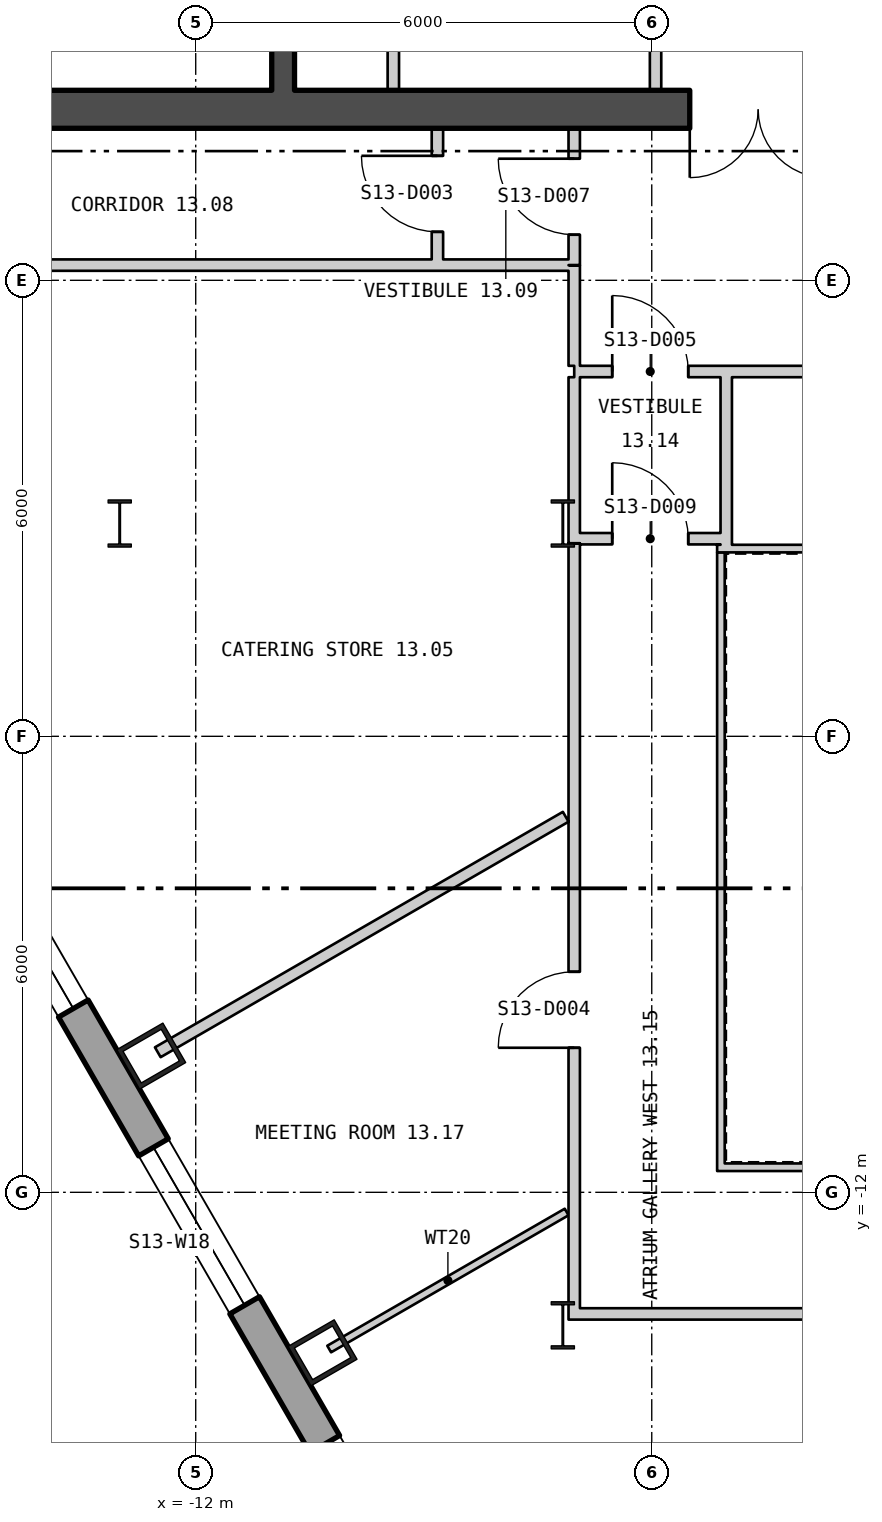
"""IFC4 building model, lengths in metres.
Left out: names, types, materials, properties, quantities, classifications, styles, units other than length and angle.
Written with IfcOpenShell. Run it as: python <this file> out.ifc"""

import sys

from ifc_helpers import new_model, si_unit, direction, frame, frame_2d, origin, origin_2d, place, context, subcontext, project, spatial, polyline, rectangle, hollow_rectangle, i_section, outline, extrude, element, fill, save


model = new_model("IFC4")
c1 = context("Model", 3, precision=1e-05, world=origin(), true_north=direction((0.0, 1.0)))
c2 = subcontext(c1, "Body", "Model", "MODEL_VIEW")
j1 = project(units=[si_unit("LENGTHUNIT", "METRE"), si_unit("PLANEANGLEUNIT", "RADIAN")], contexts=[c1])
p1 = place(None, origin())
s1 = spatial("IfcSite", under=j1, at=p1, CompositionType="ELEMENT")
p2 = place(p1, origin())
s2 = spatial("IfcBuilding", under=s1, at=p2, CompositionType="ELEMENT")
p3 = place(p2, frame((0.0, 0.0, 174.9)))
s3 = spatial("IfcBuildingStorey", under=s2, at=p3, CompositionType="ELEMENT", Elevation=174.9)
for number, where, z_axis, x_axis in (
    (1, (-12.585, -10.208, 0.0), (0.0, 0.0, 1.0), (0.5, -0.866, 0.0)),
    (2, (-10.331, -14.112, 0.0), (0.0, 0.0, 1.0), (0.5, -0.866, 0.0)),
):
    element("IfcColumn", number, at=place(p3, frame(where, z_axis=z_axis, x_axis=x_axis)), inside=s3, PredefinedType="COLUMN", context=c2, shape_type="SweptSolid", body=[
        extrude(hollow_rectangle(XDim=0.6, YDim=0.7, WallThickness=0.06, at=origin_2d()), origin(), (0.0, 0.0, 1.0), 3.9),
    ])
for number, where, z_axis, x_axis in (
    (3, (-7.17, -3.2, 0.0), (0.0, 0.0, 1.0), (1.0, 0.0, 0.0)),
    (4, (-7.17, -13.75, 0.0), (0.0, 0.0, 1.0), (1.0, 0.0, 0.0)),
    (5, (-13.0, -3.2, 0.0), (0.0, 0.0, 1.0), (1.0, 0.0, 0.0)),
):
    element("IfcColumn", number, at=place(p3, frame(where, z_axis=z_axis, x_axis=x_axis)), inside=s3, PredefinedType="COLUMN", context=c2, shape_type="SweptSolid", body=[
        extrude(i_section(OverallWidth=0.305, OverallDepth=0.62, WebThickness=0.021, FlangeThickness=0.04, at=origin_2d()), origin(), (0.0, 0.0, 1.0), 3.9),
    ])
p4 = place(p3, frame((-26.775, 13.22, -0.18), z_axis=(0.0, 0.0, 1.0), x_axis=(0.500000335318, -0.866025210188, 0.0)))
e6 = element("IfcWall", 6, at=p4, inside=s3, PredefinedType="SOLIDWALL", context=c2, shape_type="SweptSolid", body=[
    extrude(outline(polyline([(-0.13, -0.225), (45.88, -0.225), (45.62, 0.225), (0.13, 0.225), (-0.13, -0.225)])), origin(), (0.0, 0.0, 1.0), 3.68),
])
p5 = place(p4, frame((1.425, 0.0, 1.08)))
e7 = element("IfcOpeningElement", 7, at=p5, cuts=e6, PredefinedType="OPENING", context=c2, shape_type="SweptSolid", body=[
    extrude(rectangle(XDim=2.4, YDim=2.0, at=frame_2d((1.2, 1.0))), frame((0.0, 0.235, 0.0), z_axis=(0.0, -1.0, 0.0), x_axis=(1.0, 0.0, 0.0)), (0.0, 0.0, 1.0), 0.47),
])
p6 = place(p4, frame((5.895, 0.0, 1.08)))
e8 = element("IfcOpeningElement", 8, at=p6, cuts=e6, PredefinedType="OPENING", context=c2, shape_type="SweptSolid", body=[
    extrude(rectangle(XDim=2.4, YDim=2.0, at=frame_2d((1.2, 1.0))), frame((0.0, 0.235, 0.0), z_axis=(0.0, -1.0, 0.0), x_axis=(1.0, 0.0, 0.0)), (0.0, 0.0, 1.0), 0.47),
])
p7 = place(p4, frame((10.403, 0.0, 1.08)))
e9 = element("IfcOpeningElement", 9, at=p7, cuts=e6, PredefinedType="OPENING", context=c2, shape_type="SweptSolid", body=[
    extrude(rectangle(XDim=2.4, YDim=2.0, at=frame_2d((1.2, 1.0))), frame((0.0, 0.235, 0.0), z_axis=(0.0, -1.0, 0.0), x_axis=(1.0, 0.0, 0.0)), (0.0, 0.0, 1.0), 0.47),
])
p8 = place(p4, frame((14.912, 0.0, 1.08)))
e10 = element("IfcOpeningElement", 10, at=p8, cuts=e6, PredefinedType="OPENING", context=c2, shape_type="SweptSolid", body=[
    extrude(rectangle(XDim=2.4, YDim=2.0, at=frame_2d((1.2, 1.0))), frame((0.0, 0.235, 0.0), z_axis=(0.0, -1.0, 0.0), x_axis=(1.0, 0.0, 0.0)), (0.0, 0.0, 1.0), 0.47),
])
p9 = place(p4, frame((19.421, 0.0, 1.08)))
e11 = element("IfcOpeningElement", 11, at=p9, cuts=e6, PredefinedType="OPENING", context=c2, shape_type="SweptSolid", body=[
    extrude(rectangle(XDim=2.4, YDim=2.0, at=frame_2d((1.2, 1.0))), frame((0.0, 0.235, 0.0), z_axis=(0.0, -1.0, 0.0), x_axis=(1.0, 0.0, 0.0)), (0.0, 0.0, 1.0), 0.47),
])
p10 = place(p4, frame((23.929, 0.0, 1.08)))
e12 = element("IfcOpeningElement", 12, at=p10, cuts=e6, PredefinedType="OPENING", context=c2, shape_type="SweptSolid", body=[
    extrude(rectangle(XDim=2.4, YDim=2.0, at=frame_2d((1.2, 1.0))), frame((0.0, 0.235, 0.0), z_axis=(0.0, -1.0, 0.0), x_axis=(1.0, 0.0, 0.0)), (0.0, 0.0, 1.0), 0.47),
])
p11 = place(p4, frame((28.438, 0.0, 1.08)))
e13 = element("IfcOpeningElement", 13, at=p11, cuts=e6, PredefinedType="OPENING", context=c2, shape_type="SweptSolid", body=[
    extrude(rectangle(XDim=2.4, YDim=2.0, at=frame_2d((1.2, 1.0))), frame((0.0, 0.235, 0.0), z_axis=(0.0, -1.0, 0.0), x_axis=(1.0, 0.0, 0.0)), (0.0, 0.0, 1.0), 0.47),
])
p12 = place(p4, frame((32.947, 0.0, 1.08)))
e14 = element("IfcOpeningElement", 14, at=p12, cuts=e6, PredefinedType="OPENING", context=c2, shape_type="SweptSolid", body=[
    extrude(rectangle(XDim=2.4, YDim=2.0, at=frame_2d((1.2, 1.0))), frame((0.0, 0.235, 0.0), z_axis=(0.0, -1.0, 0.0), x_axis=(1.0, 0.0, 0.0)), (0.0, 0.0, 1.0), 0.47),
])
p13 = place(p4, frame((37.455, 0.0, 1.08)))
e15 = element("IfcOpeningElement", 15, at=p13, cuts=e6, PredefinedType="OPENING", context=c2, shape_type="SweptSolid", body=[
    extrude(rectangle(XDim=2.4, YDim=2.0, at=frame_2d((1.2, 1.0))), frame((0.0, 0.235, 0.0), z_axis=(0.0, -1.0, 0.0), x_axis=(1.0, 0.0, 0.0)), (0.0, 0.0, 1.0), 0.47),
])
p14 = place(p4, frame((41.925, 0.0, 1.08)))
e16 = element("IfcOpeningElement", 16, at=p14, cuts=e6, PredefinedType="OPENING", context=c2, shape_type="SweptSolid", body=[
    extrude(rectangle(XDim=2.4, YDim=2.0, at=frame_2d((1.2, 1.0))), frame((0.0, 0.235, 0.0), z_axis=(0.0, -1.0, 0.0), x_axis=(1.0, 0.0, 0.0)), (0.0, 0.0, 1.0), 0.47),
])
for number, where, z_axis, x_axis in (
    (17, (-5.14, -11.67, 0.0), (0.0, 0.0, 1.0), (1.0, 0.0, 0.0)),
    (18, (5.14, -3.53, 0.0), (0.0, 0.0, 1.0), (-1.0, 0.0, 0.0)),
):
    element("IfcWall", number, at=place(p3, frame(where, z_axis=z_axis, x_axis=x_axis)), inside=s3, PredefinedType="PARTITIONING", context=c2, shape_type="SweptSolid", body=[
        extrude(rectangle(XDim=10.28, YDim=0.1, at=frame_2d((5.14, 0.0))), origin(), (0.0, 0.0, 1.0), 3.7),
    ])
p15 = place(p3, frame((-5.09, -3.58, 0.0), z_axis=(0.0, 0.0, 1.0), x_axis=(0.0, -1.0, 0.0)))
e19 = element("IfcWall", 19, at=p15, inside=s3, PredefinedType="PARTITIONING", context=c2, shape_type="SweptSolid", body=[
    extrude(rectangle(XDim=8.04, YDim=0.1, at=frame_2d((4.02, 0.0))), origin(), (0.0, 0.0, 1.0), 3.7),
])
p16 = place(p3, frame((-16.2, 2.25, 0.0), z_axis=(0.0, 0.0, 1.0), x_axis=(1.0, 0.0, 0.0)))
e20 = element("IfcWall", 20, at=p16, inside=s3, PredefinedType="SHEAR", context=c2, shape_type="SweptSolid", body=[
    extrude(rectangle(XDim=32.4, YDim=0.5, at=frame_2d((16.2, 0.0))), origin(), (0.0, 0.0, 1.0), 3.7),
])
p17 = place(p16, frame((10.7, 0.0, 0.0)))
e21 = element("IfcOpeningElement", 21, at=p17, cuts=e20, PredefinedType="OPENING", context=c2, shape_type="SweptSolid", body=[
    extrude(rectangle(XDim=1.8, YDim=2.4, at=frame_2d((0.9, 1.2))), frame((0.0, 0.26, 0.0), z_axis=(0.0, -1.0, 0.0), x_axis=(1.0, 0.0, 0.0)), (0.0, 0.0, 1.0), 0.52),
])
p18 = place(p16, frame((20.7, 0.0, 0.0)))
e22 = element("IfcOpeningElement", 22, at=p18, cuts=e20, PredefinedType="OPENING", context=c2, shape_type="SweptSolid", body=[
    extrude(rectangle(XDim=1.8, YDim=2.4, at=frame_2d((0.9, 1.2))), frame((0.0, 0.26, 0.0), z_axis=(0.0, -1.0, 0.0), x_axis=(1.0, 0.0, 0.0)), (0.0, 0.0, 1.0), 0.52),
])
p19 = place(p3, frame((-10.85, 2.5, 0.0), z_axis=(0.0, 0.0, 1.0), x_axis=(0.0, 1.0, 0.0)))
e23 = element("IfcWall", 23, at=p19, inside=s3, PredefinedType="SHEAR", context=c2, shape_type="SweptSolid", body=[
    extrude(rectangle(XDim=15.0, YDim=0.3, at=frame_2d((7.5, 0.0))), origin(), (0.0, 0.0, 1.0), 3.7),
])
p20 = place(p19, frame((3.475, 0.0, 0.0)))
e24 = element("IfcOpeningElement", 24, at=p20, cuts=e23, PredefinedType="OPENING", context=c2, shape_type="SweptSolid", body=[
    extrude(rectangle(XDim=1.25, YDim=2.1, at=frame_2d((0.625, 1.05))), frame((0.0, 0.16, 0.0), z_axis=(0.0, -1.0, 0.0), x_axis=(1.0, 0.0, 0.0)), (0.0, 0.0, 1.0), 0.32),
])
p21 = place(p19, frame((1.125, 0.0, 0.0)))
e25 = element("IfcOpeningElement", 25, at=p21, cuts=e23, PredefinedType="OPENING", context=c2, shape_type="SweptSolid", body=[
    extrude(rectangle(XDim=1.0, YDim=2.1, at=frame_2d((0.5, 1.05))), frame((0.0, 0.16, 0.0), z_axis=(0.0, -1.0, 0.0), x_axis=(1.0, 0.0, 0.0)), (0.0, 0.0, 1.0), 0.32),
])
for number, where, z_axis, x_axis in (
    (26, (-9.4, 2.5, 0.0), (0.0, 0.0, 1.0), (0.0, 1.0, 0.0)),
    (27, (-5.95, 2.5, 0.0), (0.0, 0.0, 1.0), (0.0, 1.0, 0.0)),
):
    element("IfcWall", number, at=place(p3, frame(where, z_axis=z_axis, x_axis=x_axis)), inside=s3, PredefinedType="PARTITIONING", context=c2, shape_type="SweptSolid", body=[
        extrude(rectangle(XDim=2.975, YDim=0.15, at=frame_2d((1.488, 0.0))), origin(), (0.0, 0.0, 1.0), 3.7),
    ])
p22 = place(p3, frame((-17.925, 0.2, 0.0), z_axis=(0.0, 0.0, 1.0), x_axis=(1.0, 0.0, 0.0)))
e28 = element("IfcWall", 28, at=p22, inside=s3, PredefinedType="PARTITIONING", context=c2, shape_type="SweptSolid", body=[
    extrude(rectangle(XDim=10.83, YDim=0.15, at=frame_2d((5.415, 0.0))), origin(), (0.0, 0.0, 1.0), 3.7),
])
p23 = place(p22, frame((0.312, 0.0, 0.0)))
e29 = element("IfcOpeningElement", 29, at=p23, cuts=e28, PredefinedType="OPENING", context=c2, shape_type="SweptSolid", body=[
    extrude(rectangle(XDim=1.0, YDim=2.1, at=frame_2d((0.5, 1.05))), frame((0.0, 0.085, 0.0), z_axis=(0.0, -1.0, 0.0), x_axis=(1.0, 0.0, 0.0)), (0.0, 0.0, 1.0), 0.17),
])
p24 = place(p3, frame((-12.499, -10.157, 0.0), z_axis=(0.0, 0.0, 1.0), x_axis=(0.866070043127, 0.499922674419, 0.0)))
e30 = element("IfcWall", 30, at=p24, inside=s3, PredefinedType="PARTITIONING", context=c2, shape_type="SweptSolid", body=[
    extrude(rectangle(XDim=6.197, YDim=0.15, at=frame_2d((3.099, 0.0))), origin(), (0.0, 0.0, 1.0), 3.7),
])
p25 = place(p3, frame((-10.244, -14.062, 0.0), z_axis=(0.0, 0.0, 1.0), x_axis=(0.866102493935, 0.499866452165, 0.0)))
e31 = element("IfcWall", 31, at=p25, inside=s3, PredefinedType="PARTITIONING", context=c2, shape_type="SweptSolid", body=[
    extrude(rectangle(XDim=3.607, YDim=0.1, at=frame_2d((1.804, 0.0))), origin(), (0.0, 0.0, 1.0), 3.7),
])
p26 = place(p3, frame((-8.82, 0.275, 0.0), z_axis=(0.0, 0.0, 1.0), x_axis=(0.0, 1.0, 0.0)))
e32 = element("IfcWall", 32, at=p26, inside=s3, PredefinedType="PARTITIONING", context=c2, shape_type="SweptSolid", body=[
    extrude(rectangle(XDim=1.725, YDim=0.15, at=frame_2d((0.863, 0.0))), origin(), (0.0, 0.0, 1.0), 3.7),
])
p27 = place(p26, frame((0.363, 0.0, 0.0)))
e33 = element("IfcOpeningElement", 33, at=p27, cuts=e32, PredefinedType="OPENING", context=c2, shape_type="SweptSolid", body=[
    extrude(rectangle(XDim=1.0, YDim=2.1, at=frame_2d((0.5, 1.05))), frame((0.0, 0.085, 0.0), z_axis=(0.0, -1.0, 0.0), x_axis=(1.0, 0.0, 0.0)), (0.0, 0.0, 1.0), 0.17),
])
p28 = place(p3, frame((-7.02, -13.675, 0.0), z_axis=(0.0, 0.0, 1.0), x_axis=(0.0, 1.0, 0.0)))
e34 = element("IfcWall", 34, at=p28, inside=s3, PredefinedType="PARTITIONING", context=c2, shape_type="SweptSolid", body=[
    extrude(rectangle(XDim=10.215, YDim=0.15, at=frame_2d((5.107, 0.0))), origin(), (0.0, 0.0, 1.0), 3.11),
])
p29 = place(p28, frame((3.577, 0.0, 0.0)))
e35 = element("IfcOpeningElement", 35, at=p29, cuts=e34, PredefinedType="OPENING", context=c2, shape_type="SweptSolid", body=[
    extrude(rectangle(XDim=1.0, YDim=2.1, at=frame_2d((0.5, 1.05))), frame((0.0, 0.085, 0.0), z_axis=(0.0, -1.0, 0.0), x_axis=(1.0, 0.0, 0.0)), (0.0, 0.0, 1.0), 0.17),
])
p30 = place(p3, frame((-7.02, -3.46, 0.0), z_axis=(0.0, 0.0, 1.0), x_axis=(0.0, 1.0, 0.0)))
e36 = element("IfcWall", 36, at=p30, inside=s3, PredefinedType="PARTITIONING", context=c2, shape_type="SweptSolid", body=[
    extrude(rectangle(XDim=2.185, YDim=0.15, at=frame_2d((1.093, 0.0))), origin(), (0.0, 0.0, 1.0), 3.7),
])
p31 = place(p3, frame((-7.02, -1.2, 0.0), z_axis=(0.0, 0.0, 1.0), x_axis=(1.0, 0.0, 0.0)))
e37 = element("IfcWall", 37, at=p31, inside=s3, PredefinedType="PARTITIONING", context=c2, shape_type="SweptSolid", body=[
    extrude(rectangle(XDim=14.115, YDim=0.15, at=frame_2d((7.058, 0.0))), origin(), (0.0, 0.0, 1.0), 3.7),
])
p32 = place(p31, frame((0.5, 0.0, 0.0)))
e38 = element("IfcOpeningElement", 38, at=p32, cuts=e37, PredefinedType="OPENING", context=c2, shape_type="SweptSolid", body=[
    extrude(rectangle(XDim=1.0, YDim=2.1, at=frame_2d((0.5, 1.05))), frame((0.0, 0.085, 0.0), z_axis=(0.0, -1.0, 0.0), x_axis=(1.0, 0.0, 0.0)), (0.0, 0.0, 1.0), 0.17),
])
p33 = place(p31, frame((7.27, 0.0, 0.0)))
e39 = element("IfcOpeningElement", 39, at=p33, cuts=e37, PredefinedType="OPENING", context=c2, shape_type="SweptSolid", body=[
    extrude(rectangle(XDim=1.0, YDim=2.1, at=frame_2d((0.5, 1.05))), frame((0.0, 0.085, 0.0), z_axis=(0.0, -1.0, 0.0), x_axis=(1.0, 0.0, 0.0)), (0.0, 0.0, 1.0), 0.17),
])
p34 = place(p3, frame((-7.02, -1.125, 0.0), z_axis=(0.0, 0.0, 1.0), x_axis=(0.0, 1.0, 0.0)))
e40 = element("IfcWall", 40, at=p34, inside=s3, PredefinedType="PARTITIONING", context=c2, shape_type="SweptSolid", body=[
    extrude(rectangle(XDim=1.323, YDim=0.15, at=frame_2d((0.661, 0.0))), origin(), (0.0, 0.0, 1.0), 3.7),
])
p35 = place(p3, frame((-7.02, 0.2, 0.0), z_axis=(0.0, 0.0, 1.0), x_axis=(0.0, 1.0, 0.0)))
e41 = element("IfcWall", 41, at=p35, inside=s3, PredefinedType="PARTITIONING", context=c2, shape_type="SweptSolid", body=[
    extrude(rectangle(XDim=1.8, YDim=0.15, at=frame_2d((0.9, 0.0))), origin(), (0.0, 0.0, 1.0), 3.7),
])
p36 = place(p35, frame((0.4, 0.0, 0.0)))
e42 = element("IfcOpeningElement", 42, at=p36, cuts=e41, PredefinedType="OPENING", context=c2, shape_type="SweptSolid", body=[
    extrude(rectangle(XDim=1.0, YDim=2.1, at=frame_2d((0.5, 1.05))), frame((0.0, 0.085, 0.0), z_axis=(0.0, -1.0, 0.0), x_axis=(1.0, 0.0, 0.0)), (0.0, 0.0, 1.0), 0.17),
])
p37 = place(p3, frame((-6.945, -13.6, 0.0), z_axis=(0.0, 0.0, 1.0), x_axis=(1.0, 0.0, 0.0)))
e43 = element("IfcWall", 43, at=p37, inside=s3, PredefinedType="PARTITIONING", context=c2, shape_type="SweptSolid", body=[
    extrude(rectangle(XDim=5.245, YDim=0.15, at=frame_2d((2.623, 0.0))), origin(), (0.0, 0.0, 1.0), 2.886),
])
p38 = place(p37, frame((3.079, 0.0, 0.0)))
e44 = element("IfcOpeningElement", 44, at=p38, cuts=e43, PredefinedType="OPENING", context=c2, shape_type="SweptSolid", body=[
    extrude(rectangle(XDim=1.0, YDim=2.1, at=frame_2d((0.5, 1.05))), frame((0.0, 0.085, 0.0), z_axis=(0.0, -1.0, 0.0), x_axis=(1.0, 0.0, 0.0)), (0.0, 0.0, 1.0), 0.17),
])
p39 = place(p3, frame((-6.945, -3.4, 0.0), z_axis=(0.0, 0.0, 1.0), x_axis=(1.0, 0.0, 0.0)))
e45 = element("IfcWall", 45, at=p39, inside=s3, PredefinedType="PARTITIONING", context=c2, shape_type="SweptSolid", body=[
    extrude(rectangle(XDim=1.85, YDim=0.15, at=frame_2d((0.925, 0.0))), origin(), (0.0, 0.0, 1.0), 3.7),
])
p40 = place(p39, frame((0.425, 0.0, 0.0)))
e46 = element("IfcOpeningElement", 46, at=p40, cuts=e45, PredefinedType="OPENING", context=c2, shape_type="SweptSolid", body=[
    extrude(rectangle(XDim=1.0, YDim=2.1, at=frame_2d((0.5, 1.05))), frame((0.0, 0.085, 0.0), z_axis=(0.0, -1.0, 0.0), x_axis=(1.0, 0.0, 0.0)), (0.0, 0.0, 1.0), 0.17),
])
p41 = place(p3, frame((-5.02, -3.48, 0.0), z_axis=(0.0, 0.0, 1.0), x_axis=(0.0, 1.0, 0.0)))
e47 = element("IfcWall", 47, at=p41, inside=s3, PredefinedType="PARTITIONING", context=c2, shape_type="SweptSolid", body=[
    extrude(rectangle(XDim=2.205, YDim=0.15, at=frame_2d((1.103, 0.0))), origin(), (0.0, 0.0, 1.0), 3.7),
])
p42 = place(p10, origin())
e48 = element("IfcWindow", 48, at=p42, inside=s3, PartitioningType="SINGLE_PANEL", PredefinedType="WINDOW", context=c2, shape_type="SweptSolid", body=[
    extrude(rectangle(XDim=2.4, YDim=2.0, at=frame_2d((1.2, 1.0))), frame((0.0, 0.105, 0.0), z_axis=(0.0, -1.0, 0.0), x_axis=(1.0, 0.0, 0.0)), (0.0, 0.0, 1.0), 0.06),
])
fill(e12, e48)
p43 = place(p11, origin())
e49 = element("IfcWindow", 49, at=p43, inside=s3, PartitioningType="SINGLE_PANEL", PredefinedType="WINDOW", context=c2, shape_type="SweptSolid", body=[
    extrude(rectangle(XDim=2.4, YDim=2.0, at=frame_2d((1.2, 1.0))), frame((0.0, 0.105, 0.0), z_axis=(0.0, -1.0, 0.0), x_axis=(1.0, 0.0, 0.0)), (0.0, 0.0, 1.0), 0.06),
])
fill(e13, e49)
p44 = place(p12, origin())
e50 = element("IfcWindow", 50, at=p44, inside=s3, PartitioningType="SINGLE_PANEL", PredefinedType="WINDOW", context=c2, shape_type="SweptSolid", body=[
    extrude(rectangle(XDim=2.4, YDim=2.0, at=frame_2d((1.2, 1.0))), frame((0.0, 0.105, 0.0), z_axis=(0.0, -1.0, 0.0), x_axis=(1.0, 0.0, 0.0)), (0.0, 0.0, 1.0), 0.06),
])
fill(e14, e50)
p45 = place(p17, origin())
e51 = element("IfcDoor", 51, at=p45, inside=s3, OperationType="DOUBLE_DOOR_SINGLE_SWING", PredefinedType="DOOR", context=c2, shape_type="SweptSolid", body=[
    extrude(rectangle(XDim=1.8, YDim=2.4, at=frame_2d((0.9, 1.2))), frame((0.0, 0.025, 0.0), z_axis=(0.0, -1.0, 0.0), x_axis=(1.0, 0.0, 0.0)), (0.0, 0.0, 1.0), 0.05),
])
fill(e21, e51)
p46 = place(p27, origin())
e52 = element("IfcDoor", 52, at=p46, inside=s3, OperationType="SINGLE_SWING_LEFT", PredefinedType="DOOR", context=c2, shape_type="SweptSolid", body=[
    extrude(rectangle(XDim=1.0, YDim=2.1, at=frame_2d((0.5, 1.05))), frame((0.0, 0.025, 0.0), z_axis=(0.0, -1.0, 0.0), x_axis=(1.0, 0.0, 0.0)), (0.0, 0.0, 1.0), 0.05),
])
fill(e33, e52)
p47 = place(p29, origin())
e53 = element("IfcDoor", 53, at=p47, inside=s3, OperationType="SINGLE_SWING_RIGHT", PredefinedType="DOOR", context=c2, shape_type="SweptSolid", body=[
    extrude(rectangle(XDim=1.0, YDim=2.1, at=frame_2d((0.5, 1.05))), frame((0.0, 0.025, 0.0), z_axis=(0.0, -1.0, 0.0), x_axis=(1.0, 0.0, 0.0)), (0.0, 0.0, 1.0), 0.05),
])
fill(e35, e53)
p48 = place(p32, origin())
e54 = element("IfcDoor", 54, at=p48, inside=s3, OperationType="SINGLE_SWING_RIGHT", PredefinedType="DOOR", context=c2, shape_type="SweptSolid", body=[
    extrude(rectangle(XDim=1.0, YDim=2.1, at=frame_2d((0.5, 1.05))), frame((0.0, 0.025, 0.0), z_axis=(0.0, -1.0, 0.0), x_axis=(1.0, 0.0, 0.0)), (0.0, 0.0, 1.0), 0.05),
])
fill(e38, e54)
p49 = place(p36, origin())
e55 = element("IfcDoor", 55, at=p49, inside=s3, OperationType="SINGLE_SWING_LEFT", PredefinedType="DOOR", context=c2, shape_type="SweptSolid", body=[
    extrude(rectangle(XDim=1.0, YDim=2.1, at=frame_2d((0.5, 1.05))), frame((0.0, 0.025, 0.0), z_axis=(0.0, -1.0, 0.0), x_axis=(1.0, 0.0, 0.0)), (0.0, 0.0, 1.0), 0.05),
])
fill(e42, e55)
p50 = place(p40, origin())
e56 = element("IfcDoor", 56, at=p50, inside=s3, OperationType="SINGLE_SWING_RIGHT", PredefinedType="DOOR", context=c2, shape_type="SweptSolid", body=[
    extrude(rectangle(XDim=1.0, YDim=2.1, at=frame_2d((0.5, 1.05))), frame((0.0, 0.025, 0.0), z_axis=(0.0, -1.0, 0.0), x_axis=(1.0, 0.0, 0.0)), (0.0, 0.0, 1.0), 0.05),
])
fill(e46, e56)
save(model, sys.argv[1])
